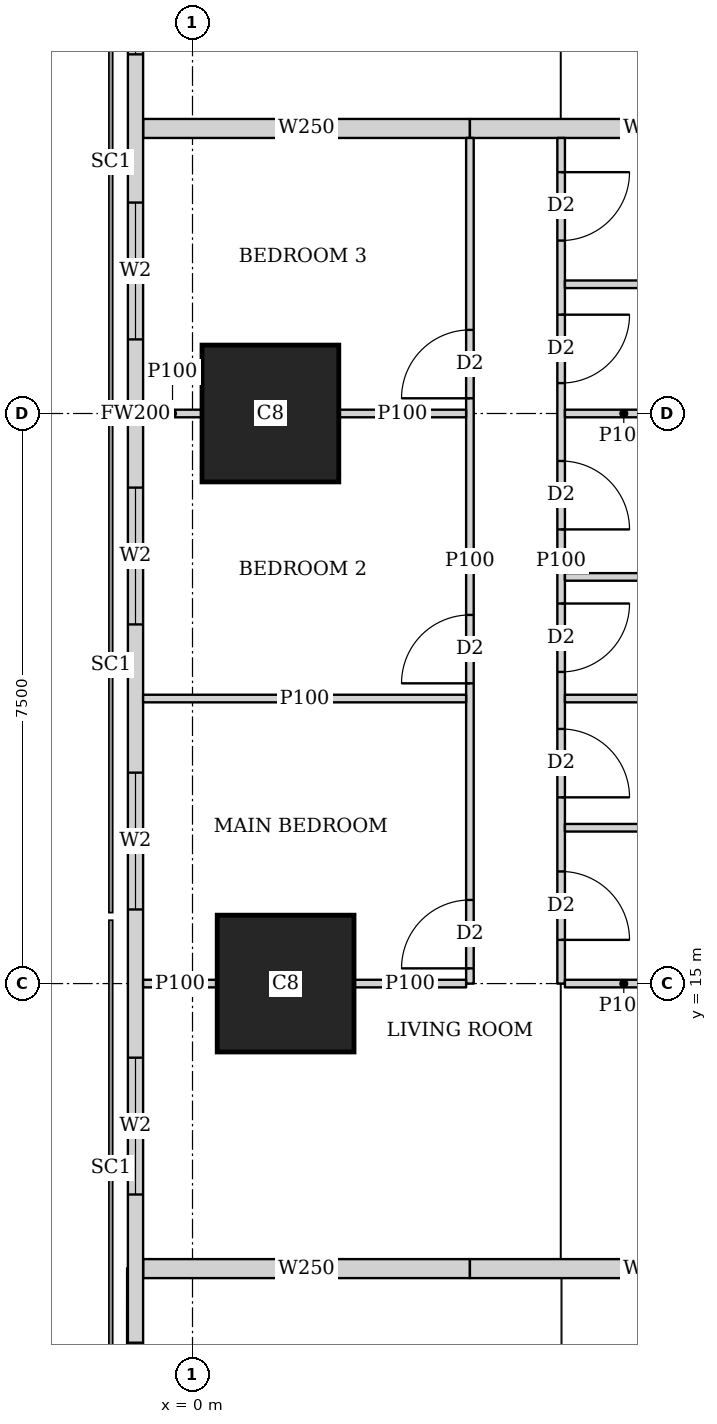
"""IFC4 building model, lengths in metres.
Left out: names, types, materials, properties, quantities, classifications, styles, units other than length and angle.
Written with IfcOpenShell. Run it as: python <this file> out.ifc"""

import sys

from ifc_helpers import new_model, si_unit, direction, frame, frame_2d, origin, origin_2d, place, context, subcontext, project, spatial, rectangle, extrude, element, fill, save


model = new_model("IFC4")
c1 = context("Model", 3, precision=1e-05, world=origin(), true_north=direction((0.0, 1.0)))
c2 = subcontext(c1, "Body", "Model", "MODEL_VIEW")
j1 = project(units=[si_unit("LENGTHUNIT", "METRE"), si_unit("PLANEANGLEUNIT", "RADIAN")], contexts=[c1])
p1 = place(None, origin())
s1 = spatial("IfcSite", under=j1, at=p1, CompositionType="ELEMENT")
p2 = place(p1, origin())
s2 = spatial("IfcBuilding", under=s1, at=p2, CompositionType="ELEMENT")
p3 = place(p2, frame((0.0, 0.0, 135.8)))
s3 = spatial("IfcBuildingStorey", under=s2, at=p3, CompositionType="ELEMENT", Elevation=135.8)
for number, where, z_axis, x_axis in (
    (1, (1.225, 15.0, 0.0), (0.0, 0.0, 1.0), (1.0, 0.0, 0.0)),
    (2, (1.025, 22.5, 0.0), (0.0, 0.0, 1.0), (1.0, 0.0, 0.0)),
):
    element("IfcColumn", number, at=place(p3, frame(where, z_axis=z_axis, x_axis=x_axis)), inside=s3, PredefinedType="COLUMN", context=c2, shape_type="SweptSolid", body=[
        extrude(rectangle(XDim=1.8, YDim=1.8, at=origin_2d()), origin(), (0.0, 0.0, 1.0), 3.75),
    ])
p4 = place(p3, frame((-0.75, 42.837, 0.0), z_axis=(0.0, 0.0, 1.0), x_axis=(0.0, -1.0, 0.0)))
e3 = element("IfcWall", 3, at=p4, inside=s3, PredefinedType="SOLIDWALL", context=c2, shape_type="SweptSolid", body=[
    extrude(rectangle(XDim=40.674, YDim=0.2, at=frame_2d((20.337, 0.0))), origin(), (0.0, 0.0, 1.0), 3.5),
])
p5 = place(p4, frame((1.78, 0.0, 0.9)))
e4 = element("IfcOpeningElement", 4, at=p5, cuts=e3, PredefinedType="OPENING", context=c2, shape_type="SweptSolid", body=[
    extrude(rectangle(XDim=1.8, YDim=1.5, at=frame_2d((0.9, 0.75))), frame((0.0, 0.11, 0.0), z_axis=(0.0, -1.0, 0.0), x_axis=(1.0, 0.0, 0.0)), (0.0, 0.0, 1.0), 0.22),
])
p6 = place(p4, frame((6.312, 0.0, 0.9)))
e5 = element("IfcOpeningElement", 5, at=p6, cuts=e3, PredefinedType="OPENING", context=c2, shape_type="SweptSolid", body=[
    extrude(rectangle(XDim=1.8, YDim=1.5, at=frame_2d((0.9, 0.75))), frame((0.0, 0.11, 0.0), z_axis=(0.0, -1.0, 0.0), x_axis=(1.0, 0.0, 0.0)), (0.0, 0.0, 1.0), 0.22),
])
p7 = place(p4, frame((10.062, 0.0, 0.9)))
e6 = element("IfcOpeningElement", 6, at=p7, cuts=e3, PredefinedType="OPENING", context=c2, shape_type="SweptSolid", body=[
    extrude(rectangle(XDim=1.8, YDim=1.5, at=frame_2d((0.9, 0.75))), frame((0.0, 0.11, 0.0), z_axis=(0.0, -1.0, 0.0), x_axis=(1.0, 0.0, 0.0)), (0.0, 0.0, 1.0), 0.22),
])
p8 = place(p4, frame((13.812, 0.0, 0.9)))
e7 = element("IfcOpeningElement", 7, at=p8, cuts=e3, PredefinedType="OPENING", context=c2, shape_type="SweptSolid", body=[
    extrude(rectangle(XDim=1.8, YDim=1.5, at=frame_2d((0.9, 0.75))), frame((0.0, 0.11, 0.0), z_axis=(0.0, -1.0, 0.0), x_axis=(1.0, 0.0, 0.0)), (0.0, 0.0, 1.0), 0.22),
])
p9 = place(p4, frame((17.562, 0.0, 0.9)))
e8 = element("IfcOpeningElement", 8, at=p9, cuts=e3, PredefinedType="OPENING", context=c2, shape_type="SweptSolid", body=[
    extrude(rectangle(XDim=1.8, YDim=1.5, at=frame_2d((0.9, 0.75))), frame((0.0, 0.11, 0.0), z_axis=(0.0, -1.0, 0.0), x_axis=(1.0, 0.0, 0.0)), (0.0, 0.0, 1.0), 0.22),
])
p10 = place(p4, frame((21.312, 0.0, 0.9)))
e9 = element("IfcOpeningElement", 9, at=p10, cuts=e3, PredefinedType="OPENING", context=c2, shape_type="SweptSolid", body=[
    extrude(rectangle(XDim=1.8, YDim=1.5, at=frame_2d((0.9, 0.75))), frame((0.0, 0.11, 0.0), z_axis=(0.0, -1.0, 0.0), x_axis=(1.0, 0.0, 0.0)), (0.0, 0.0, 1.0), 0.22),
])
p11 = place(p4, frame((25.062, 0.0, 0.9)))
e10 = element("IfcOpeningElement", 10, at=p11, cuts=e3, PredefinedType="OPENING", context=c2, shape_type="SweptSolid", body=[
    extrude(rectangle(XDim=1.8, YDim=1.5, at=frame_2d((0.9, 0.75))), frame((0.0, 0.11, 0.0), z_axis=(0.0, -1.0, 0.0), x_axis=(1.0, 0.0, 0.0)), (0.0, 0.0, 1.0), 0.22),
])
p12 = place(p4, frame((28.812, 0.0, 0.9)))
e11 = element("IfcOpeningElement", 11, at=p12, cuts=e3, PredefinedType="OPENING", context=c2, shape_type="SweptSolid", body=[
    extrude(rectangle(XDim=1.8, YDim=1.5, at=frame_2d((0.9, 0.75))), frame((0.0, 0.11, 0.0), z_axis=(0.0, -1.0, 0.0), x_axis=(1.0, 0.0, 0.0)), (0.0, 0.0, 1.0), 0.22),
])
p13 = place(p4, frame((32.562, 0.0, 0.9)))
e12 = element("IfcOpeningElement", 12, at=p13, cuts=e3, PredefinedType="OPENING", context=c2, shape_type="SweptSolid", body=[
    extrude(rectangle(XDim=1.8, YDim=1.5, at=frame_2d((0.9, 0.75))), frame((0.0, 0.11, 0.0), z_axis=(0.0, -1.0, 0.0), x_axis=(1.0, 0.0, 0.0)), (0.0, 0.0, 1.0), 0.22),
])
p14 = place(p4, frame((37.094, 0.0, 0.9)))
e13 = element("IfcOpeningElement", 13, at=p14, cuts=e3, PredefinedType="OPENING", context=c2, shape_type="SweptSolid", body=[
    extrude(rectangle(XDim=1.8, YDim=1.5, at=frame_2d((0.9, 0.75))), frame((0.0, 0.11, 0.0), z_axis=(0.0, -1.0, 0.0), x_axis=(1.0, 0.0, 0.0)), (0.0, 0.0, 1.0), 0.22),
])
p15 = place(p3, frame((3.65, 15.0, 0.0), z_axis=(0.0, 0.0, 1.0), x_axis=(0.0, 1.0, 0.0)))
e14 = element("IfcWall", 14, at=p15, inside=s3, PredefinedType="PARTITIONING", context=c2, shape_type="SweptSolid", body=[
    extrude(rectangle(XDim=11.125, YDim=0.1, at=frame_2d((5.562, 0.0))), origin(), (0.0, 0.0, 1.0), 3.5),
])
p16 = place(p15, frame((0.2, 0.0, 0.0)))
e15 = element("IfcOpeningElement", 15, at=p16, cuts=e14, PredefinedType="OPENING", context=c2, shape_type="SweptSolid", body=[
    extrude(rectangle(XDim=0.9, YDim=2.1, at=frame_2d((0.45, 1.05))), frame((0.0, 0.06, 0.0), z_axis=(0.0, -1.0, 0.0), x_axis=(1.0, 0.0, 0.0)), (0.0, 0.0, 1.0), 0.12),
])
p17 = place(p15, frame((3.95, 0.0, 0.0)))
e16 = element("IfcOpeningElement", 16, at=p17, cuts=e14, PredefinedType="OPENING", context=c2, shape_type="SweptSolid", body=[
    extrude(rectangle(XDim=0.9, YDim=2.1, at=frame_2d((0.45, 1.05))), frame((0.0, 0.06, 0.0), z_axis=(0.0, -1.0, 0.0), x_axis=(1.0, 0.0, 0.0)), (0.0, 0.0, 1.0), 0.12),
])
p18 = place(p15, frame((7.7, 0.0, 0.0)))
e17 = element("IfcOpeningElement", 17, at=p18, cuts=e14, PredefinedType="OPENING", context=c2, shape_type="SweptSolid", body=[
    extrude(rectangle(XDim=0.9, YDim=2.1, at=frame_2d((0.45, 1.05))), frame((0.0, 0.06, 0.0), z_axis=(0.0, -1.0, 0.0), x_axis=(1.0, 0.0, 0.0)), (0.0, 0.0, 1.0), 0.12),
])
p19 = place(p3, frame((4.85, 15.0, 0.0), z_axis=(0.0, 0.0, 1.0), x_axis=(0.0, 1.0, 0.0)))
e18 = element("IfcWall", 18, at=p19, inside=s3, PredefinedType="PARTITIONING", context=c2, shape_type="SweptSolid", body=[
    extrude(rectangle(XDim=11.125, YDim=0.1, at=frame_2d((5.562, 0.0))), origin(), (0.0, 0.0, 1.0), 3.5),
])
p20 = place(p19, frame((0.575, 0.0, 0.0)))
e19 = element("IfcOpeningElement", 19, at=p20, cuts=e18, PredefinedType="OPENING", context=c2, shape_type="SweptSolid", body=[
    extrude(rectangle(XDim=0.9, YDim=2.1, at=frame_2d((0.45, 1.05))), frame((0.0, 0.06, 0.0), z_axis=(0.0, -1.0, 0.0), x_axis=(1.0, 0.0, 0.0)), (0.0, 0.0, 1.0), 0.12),
])
p21 = place(p19, frame((4.1, 0.0, 0.0)))
e20 = element("IfcOpeningElement", 20, at=p21, cuts=e18, PredefinedType="OPENING", context=c2, shape_type="SweptSolid", body=[
    extrude(rectangle(XDim=0.9, YDim=2.1, at=frame_2d((0.45, 1.05))), frame((0.0, 0.06, 0.0), z_axis=(0.0, -1.0, 0.0), x_axis=(1.0, 0.0, 0.0)), (0.0, 0.0, 1.0), 0.12),
])
p22 = place(p19, frame((7.9, 0.0, 0.0)))
e21 = element("IfcOpeningElement", 21, at=p22, cuts=e18, PredefinedType="OPENING", context=c2, shape_type="SweptSolid", body=[
    extrude(rectangle(XDim=0.9, YDim=2.1, at=frame_2d((0.45, 1.05))), frame((0.0, 0.06, 0.0), z_axis=(0.0, -1.0, 0.0), x_axis=(1.0, 0.0, 0.0)), (0.0, 0.0, 1.0), 0.12),
])
p23 = place(p19, frame((2.45, 0.0, 0.0)))
e22 = element("IfcOpeningElement", 22, at=p23, cuts=e18, PredefinedType="OPENING", context=c2, shape_type="SweptSolid", body=[
    extrude(rectangle(XDim=0.9, YDim=2.1, at=frame_2d((0.45, 1.05))), frame((0.0, 0.06, 0.0), z_axis=(0.0, -1.0, 0.0), x_axis=(1.0, 0.0, 0.0)), (0.0, 0.0, 1.0), 0.12),
])
p24 = place(p19, frame((5.975, 0.0, 0.0)))
e23 = element("IfcOpeningElement", 23, at=p24, cuts=e18, PredefinedType="OPENING", context=c2, shape_type="SweptSolid", body=[
    extrude(rectangle(XDim=0.9, YDim=2.1, at=frame_2d((0.45, 1.05))), frame((0.0, 0.06, 0.0), z_axis=(0.0, -1.0, 0.0), x_axis=(1.0, 0.0, 0.0)), (0.0, 0.0, 1.0), 0.12),
])
p25 = place(p19, frame((9.775, 0.0, 0.0)))
e24 = element("IfcOpeningElement", 24, at=p25, cuts=e18, PredefinedType="OPENING", context=c2, shape_type="SweptSolid", body=[
    extrude(rectangle(XDim=0.9, YDim=2.1, at=frame_2d((0.45, 1.05))), frame((0.0, 0.06, 0.0), z_axis=(0.0, -1.0, 0.0), x_axis=(1.0, 0.0, 0.0)), (0.0, 0.0, 1.0), 0.12),
])
p26 = place(p3, frame((-0.65, 15.0, 0.0), z_axis=(0.0, 0.0, 1.0), x_axis=(1.0, 0.0, 0.0)))
e25 = element("IfcWall", 25, at=p26, inside=s3, PredefinedType="PARTITIONING", context=c2, shape_type="SweptSolid", body=[
    extrude(rectangle(XDim=0.974, YDim=0.1, at=frame_2d((0.487, 0.0))), origin(), (0.0, 0.0, 1.0), 3.5),
])
p27 = place(p3, frame((2.126, 15.0, 0.0), z_axis=(0.0, 0.0, 1.0), x_axis=(1.0, 0.0, 0.0)))
e26 = element("IfcWall", 26, at=p27, inside=s3, PredefinedType="PARTITIONING", context=c2, shape_type="SweptSolid", body=[
    extrude(rectangle(XDim=1.474, YDim=0.1, at=frame_2d((0.737, 0.0))), origin(), (0.0, 0.0, 1.0), 3.5),
])
p28 = place(p3, frame((-0.65, 18.75, 0.0), z_axis=(0.0, 0.0, 1.0), x_axis=(1.0, 0.0, 0.0)))
e27 = element("IfcWall", 27, at=p28, inside=s3, PredefinedType="PARTITIONING", context=c2, shape_type="SweptSolid", body=[
    extrude(rectangle(XDim=4.25, YDim=0.1, at=frame_2d((2.125, 0.0))), origin(), (0.0, 0.0, 1.0), 2.1),
])
p29 = place(p3, frame((-0.65, 22.5, 0.0), z_axis=(0.0, 0.0, 1.0), x_axis=(1.0, 0.0, 0.0)))
e28 = element("IfcWall", 28, at=p29, inside=s3, PredefinedType="PARTITIONING", context=c2, shape_type="SweptSolid", body=[
    extrude(rectangle(XDim=0.774, YDim=0.1, at=frame_2d((0.387, 0.0))), origin(), (0.0, 0.0, 1.0), 3.5),
])
p30 = place(p3, frame((1.926, 22.5, 0.0), z_axis=(0.0, 0.0, 1.0), x_axis=(1.0, 0.0, 0.0)))
e29 = element("IfcWall", 29, at=p30, inside=s3, PredefinedType="PARTITIONING", context=c2, shape_type="SweptSolid", body=[
    extrude(rectangle(XDim=1.674, YDim=0.1, at=frame_2d((0.837, 0.0))), origin(), (0.0, 0.0, 1.0), 3.5),
])
p31 = place(p3, frame((4.9, 15.0, 0.0), z_axis=(0.0, 0.0, 1.0), x_axis=(1.0, 0.0, 0.0)))
e30 = element("IfcWall", 30, at=p31, inside=s3, PredefinedType="PARTITIONING", context=c2, shape_type="SweptSolid", body=[
    extrude(rectangle(XDim=1.549, YDim=0.1, at=frame_2d((0.774, 0.0))), origin(), (0.0, 0.0, 1.0), 3.5),
])
p32 = place(p3, frame((4.9, 18.75, 0.0), z_axis=(0.0, 0.0, 1.0), x_axis=(1.0, 0.0, 0.0)))
e31 = element("IfcWall", 31, at=p32, inside=s3, PredefinedType="PARTITIONING", context=c2, shape_type="SweptSolid", body=[
    extrude(rectangle(XDim=3.525, YDim=0.1, at=frame_2d((1.763, 0.0))), origin(), (0.0, 0.0, 1.0), 3.5),
])
p33 = place(p3, frame((4.9, 22.5, 0.0), z_axis=(0.0, 0.0, 1.0), x_axis=(1.0, 0.0, 0.0)))
e32 = element("IfcWall", 32, at=p33, inside=s3, PredefinedType="PARTITIONING", context=c2, shape_type="SweptSolid", body=[
    extrude(rectangle(XDim=1.549, YDim=0.1, at=frame_2d((0.774, 0.0))), origin(), (0.0, 0.0, 1.0), 3.5),
])
for number, where, z_axis, x_axis in (
    (33, (4.9, 17.05, 0.0), (0.0, 0.0, 1.0), (1.0, 0.0, 0.0)),
    (34, (4.9, 20.35, 0.0), (0.0, 0.0, 1.0), (1.0, 0.0, 0.0)),
    (35, (4.9, 24.2, 0.0), (0.0, 0.0, 1.0), (1.0, 0.0, 0.0)),
):
    element("IfcWall", number, at=place(p3, frame(where, z_axis=z_axis, x_axis=x_axis)), inside=s3, PredefinedType="PARTITIONING", context=c2, shape_type="SweptSolid", body=[
        extrude(rectangle(XDim=3.525, YDim=0.1, at=frame_2d((1.763, 0.0))), origin(), (0.0, 0.0, 1.0), 3.5),
    ])
p34 = place(p3, frame((-0.65, 11.25, 0.0), z_axis=(0.0, 0.0, 1.0), x_axis=(1.0, 0.0, 0.0)))
e36 = element("IfcWall", 36, at=p34, inside=s3, PredefinedType="SOLIDWALL", context=c2, shape_type="SweptSolid", body=[
    extrude(rectangle(XDim=4.3, YDim=0.25, at=frame_2d((2.15, 0.0))), origin(), (0.0, 0.0, 1.0), 2.1),
])
p35 = place(p3, frame((3.65, 11.25, 0.0), z_axis=(0.0, 0.0, 1.0), x_axis=(1.0, 0.0, 0.0)))
e37 = element("IfcWall", 37, at=p35, inside=s3, PredefinedType="SOLIDWALL", context=c2, shape_type="SweptSolid", body=[
    extrude(rectangle(XDim=4.775, YDim=0.25, at=frame_2d((2.388, 0.0))), origin(), (0.0, 0.0, 1.0), 3.5),
])
p36 = place(p3, frame((-0.65, 26.25, 0.0), z_axis=(0.0, 0.0, 1.0), x_axis=(1.0, 0.0, 0.0)))
e38 = element("IfcWall", 38, at=p36, inside=s3, PredefinedType="SOLIDWALL", context=c2, shape_type="SweptSolid", body=[
    extrude(rectangle(XDim=4.3, YDim=0.25, at=frame_2d((2.15, 0.0))), origin(), (0.0, 0.0, 1.0), 2.1),
])
p37 = place(p3, frame((3.65, 26.25, 0.0), z_axis=(0.0, 0.0, 1.0), x_axis=(1.0, 0.0, 0.0)))
e39 = element("IfcWall", 39, at=p37, inside=s3, PredefinedType="SOLIDWALL", context=c2, shape_type="SweptSolid", body=[
    extrude(rectangle(XDim=4.775, YDim=0.25, at=frame_2d((2.388, 0.0))), origin(), (0.0, 0.0, 1.0), 3.5),
])
p38 = place(p8, origin())
e40 = element("IfcWindow", 40, at=p38, inside=s3, PartitioningType="SINGLE_PANEL", PredefinedType="WINDOW", context=c2, shape_type="SweptSolid", body=[
    extrude(rectangle(XDim=1.8, YDim=1.5, at=frame_2d((0.9, 0.75))), frame((0.0, 0.03, 0.0), z_axis=(0.0, -1.0, 0.0), x_axis=(1.0, 0.0, 0.0)), (0.0, 0.0, 1.0), 0.06),
])
fill(e7, e40)
p39 = place(p9, origin())
e41 = element("IfcWindow", 41, at=p39, inside=s3, PartitioningType="SINGLE_PANEL", PredefinedType="WINDOW", context=c2, shape_type="SweptSolid", body=[
    extrude(rectangle(XDim=1.8, YDim=1.5, at=frame_2d((0.9, 0.75))), frame((0.0, 0.03, 0.0), z_axis=(0.0, -1.0, 0.0), x_axis=(1.0, 0.0, 0.0)), (0.0, 0.0, 1.0), 0.06),
])
fill(e8, e41)
p40 = place(p10, origin())
e42 = element("IfcWindow", 42, at=p40, inside=s3, PartitioningType="SINGLE_PANEL", PredefinedType="WINDOW", context=c2, shape_type="SweptSolid", body=[
    extrude(rectangle(XDim=1.8, YDim=1.5, at=frame_2d((0.9, 0.75))), frame((0.0, 0.03, 0.0), z_axis=(0.0, -1.0, 0.0), x_axis=(1.0, 0.0, 0.0)), (0.0, 0.0, 1.0), 0.06),
])
fill(e9, e42)
p41 = place(p11, origin())
e43 = element("IfcWindow", 43, at=p41, inside=s3, PartitioningType="SINGLE_PANEL", PredefinedType="WINDOW", context=c2, shape_type="SweptSolid", body=[
    extrude(rectangle(XDim=1.8, YDim=1.5, at=frame_2d((0.9, 0.75))), frame((0.0, 0.03, 0.0), z_axis=(0.0, -1.0, 0.0), x_axis=(1.0, 0.0, 0.0)), (0.0, 0.0, 1.0), 0.06),
])
fill(e10, e43)
p42 = place(p12, origin())
e44 = element("IfcWindow", 44, at=p42, inside=s3, PartitioningType="SINGLE_PANEL", PredefinedType="WINDOW", context=c2, shape_type="SweptSolid", body=[
    extrude(rectangle(XDim=1.8, YDim=1.5, at=frame_2d((0.9, 0.75))), frame((0.0, 0.03, 0.0), z_axis=(0.0, -1.0, 0.0), x_axis=(1.0, 0.0, 0.0)), (0.0, 0.0, 1.0), 0.06),
])
fill(e11, e44)
p43 = place(p13, origin())
e45 = element("IfcWindow", 45, at=p43, inside=s3, PartitioningType="SINGLE_PANEL", PredefinedType="WINDOW", context=c2, shape_type="SweptSolid", body=[
    extrude(rectangle(XDim=1.8, YDim=1.5, at=frame_2d((0.9, 0.75))), frame((0.0, 0.03, 0.0), z_axis=(0.0, -1.0, 0.0), x_axis=(1.0, 0.0, 0.0)), (0.0, 0.0, 1.0), 0.06),
])
fill(e12, e45)
p44 = place(p16, origin())
e46 = element("IfcDoor", 46, at=p44, inside=s3, OperationType="SINGLE_SWING_LEFT", PredefinedType="DOOR", context=c2, shape_type="SweptSolid", body=[
    extrude(rectangle(XDim=0.9, YDim=2.1, at=frame_2d((0.45, 1.05))), frame((0.0, 0.025, 0.0), z_axis=(0.0, -1.0, 0.0), x_axis=(1.0, 0.0, 0.0)), (0.0, 0.0, 1.0), 0.05),
])
fill(e15, e46)
p45 = place(p17, origin())
e47 = element("IfcDoor", 47, at=p45, inside=s3, OperationType="SINGLE_SWING_LEFT", PredefinedType="DOOR", context=c2, shape_type="SweptSolid", body=[
    extrude(rectangle(XDim=0.9, YDim=2.1, at=frame_2d((0.45, 1.05))), frame((0.0, 0.025, 0.0), z_axis=(0.0, -1.0, 0.0), x_axis=(1.0, 0.0, 0.0)), (0.0, 0.0, 1.0), 0.05),
])
fill(e16, e47)
p46 = place(p18, origin())
e48 = element("IfcDoor", 48, at=p46, inside=s3, OperationType="SINGLE_SWING_LEFT", PredefinedType="DOOR", context=c2, shape_type="SweptSolid", body=[
    extrude(rectangle(XDim=0.9, YDim=2.1, at=frame_2d((0.45, 1.05))), frame((0.0, 0.025, 0.0), z_axis=(0.0, -1.0, 0.0), x_axis=(1.0, 0.0, 0.0)), (0.0, 0.0, 1.0), 0.05),
])
fill(e17, e48)
p47 = place(p20, origin())
e49 = element("IfcDoor", 49, at=p47, inside=s3, OperationType="SINGLE_SWING_RIGHT", PredefinedType="DOOR", context=c2, shape_type="SweptSolid", body=[
    extrude(rectangle(XDim=0.9, YDim=2.1, at=frame_2d((0.45, 1.05))), frame((0.0, 0.025, 0.0), z_axis=(0.0, -1.0, 0.0), x_axis=(1.0, 0.0, 0.0)), (0.0, 0.0, 1.0), 0.05),
])
fill(e19, e49)
p48 = place(p21, origin())
e50 = element("IfcDoor", 50, at=p48, inside=s3, OperationType="SINGLE_SWING_LEFT", PredefinedType="DOOR", context=c2, shape_type="SweptSolid", body=[
    extrude(rectangle(XDim=0.9, YDim=2.1, at=frame_2d((0.45, 1.05))), frame((0.0, 0.025, 0.0), z_axis=(0.0, -1.0, 0.0), x_axis=(1.0, 0.0, 0.0)), (0.0, 0.0, 1.0), 0.05),
])
fill(e20, e50)
p49 = place(p22, origin())
e51 = element("IfcDoor", 51, at=p49, inside=s3, OperationType="SINGLE_SWING_LEFT", PredefinedType="DOOR", context=c2, shape_type="SweptSolid", body=[
    extrude(rectangle(XDim=0.9, YDim=2.1, at=frame_2d((0.45, 1.05))), frame((0.0, 0.025, 0.0), z_axis=(0.0, -1.0, 0.0), x_axis=(1.0, 0.0, 0.0)), (0.0, 0.0, 1.0), 0.05),
])
fill(e21, e51)
p50 = place(p23, origin())
e52 = element("IfcDoor", 52, at=p50, inside=s3, OperationType="SINGLE_SWING_RIGHT", PredefinedType="DOOR", context=c2, shape_type="SweptSolid", body=[
    extrude(rectangle(XDim=0.9, YDim=2.1, at=frame_2d((0.45, 1.05))), frame((0.0, 0.025, 0.0), z_axis=(0.0, -1.0, 0.0), x_axis=(1.0, 0.0, 0.0)), (0.0, 0.0, 1.0), 0.05),
])
fill(e22, e52)
p51 = place(p24, origin())
e53 = element("IfcDoor", 53, at=p51, inside=s3, OperationType="SINGLE_SWING_RIGHT", PredefinedType="DOOR", context=c2, shape_type="SweptSolid", body=[
    extrude(rectangle(XDim=0.9, YDim=2.1, at=frame_2d((0.45, 1.05))), frame((0.0, 0.025, 0.0), z_axis=(0.0, -1.0, 0.0), x_axis=(1.0, 0.0, 0.0)), (0.0, 0.0, 1.0), 0.05),
])
fill(e23, e53)
p52 = place(p25, origin())
e54 = element("IfcDoor", 54, at=p52, inside=s3, OperationType="SINGLE_SWING_LEFT", PredefinedType="DOOR", context=c2, shape_type="SweptSolid", body=[
    extrude(rectangle(XDim=0.9, YDim=2.1, at=frame_2d((0.45, 1.05))), frame((0.0, 0.025, 0.0), z_axis=(0.0, -1.0, 0.0), x_axis=(1.0, 0.0, 0.0)), (0.0, 0.0, 1.0), 0.05),
])
fill(e24, e54)
save(model, sys.argv[1])
